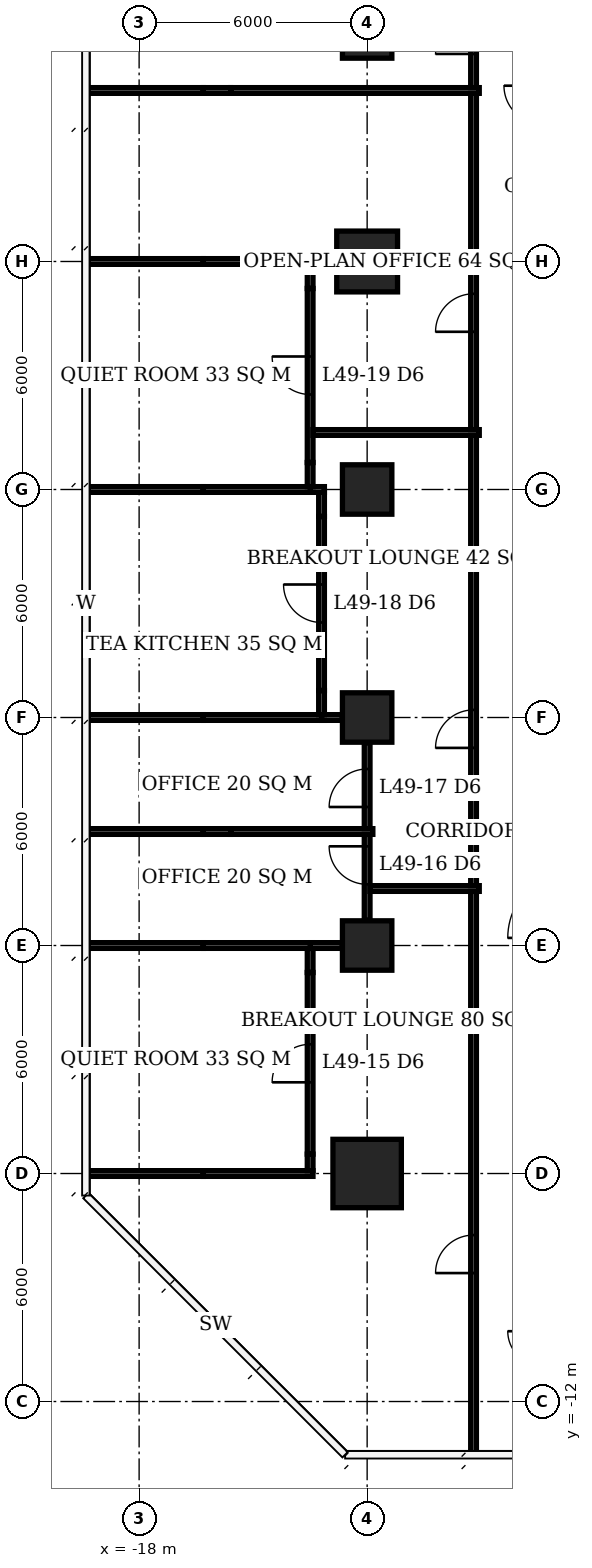
"""IFC4 building model, lengths in metres.
Left out: names, types, materials, properties, quantities, classifications, styles, units other than length and angle.
Written with IfcOpenShell. Run it as: python <this file> out.ifc"""

import sys

from ifc_helpers import new_model, si_unit, direction, frame, frame_2d, origin, origin_2d, place, context, subcontext, project, spatial, rectangle, extrude, element, fill, save


model = new_model("IFC4")
c1 = context("Model", 3, precision=1e-05, world=origin(), true_north=direction((0.0, 1.0)))
c2 = subcontext(c1, "Body", "Model", "MODEL_VIEW")
j1 = project(units=[si_unit("LENGTHUNIT", "METRE"), si_unit("PLANEANGLEUNIT", "RADIAN")], contexts=[c1])
p1 = place(None, origin())
s1 = spatial("IfcSite", under=j1, at=p1, CompositionType="ELEMENT")
p2 = place(p1, origin())
s2 = spatial("IfcBuilding", under=s1, at=p2, CompositionType="ELEMENT")
p3 = place(p2, frame((0.0, 0.0, 200.6)))
s3 = spatial("IfcBuildingStorey", under=s2, at=p3, CompositionType="ELEMENT", Elevation=200.6)
p4 = place(p3, frame((-12.0, -6.0, 0.0), z_axis=(0.0, 0.0, 1.0), x_axis=(1.0, 0.0, 0.0)))
e1 = element("IfcColumn", 1, at=p4, inside=s3, PredefinedType="COLUMN", context=c2, shape_type="SweptSolid", body=[
    extrude(rectangle(XDim=1.8, YDim=1.8, at=origin_2d()), origin(), (0.0, 0.0, 1.0), 3.9),
])
for number, where, z_axis, x_axis in (
    (2, (-12.0, 0.0, 0.0), (0.0, 0.0, 1.0), (1.0, 0.0, 0.0)),
    (3, (-12.0, 6.0, 0.0), (0.0, 0.0, 1.0), (1.0, 0.0, 0.0)),
    (4, (-12.0, 12.0, 0.0), (0.0, 0.0, 1.0), (1.0, 0.0, 0.0)),
):
    element("IfcColumn", number, at=place(p3, frame(where, z_axis=z_axis, x_axis=x_axis)), inside=s3, PredefinedType="COLUMN", context=c2, shape_type="SweptSolid", body=[
        extrude(rectangle(XDim=1.3, YDim=1.3, at=origin_2d()), origin(), (0.0, 0.0, 1.0), 3.9),
    ])
p5 = place(p3, frame((-12.0, 18.0, 0.0), z_axis=(0.0, 0.0, 1.0), x_axis=(1.0, 0.0, 0.0)))
e5 = element("IfcColumn", 5, at=p5, inside=s3, PredefinedType="COLUMN", context=c2, shape_type="SweptSolid", body=[
    extrude(rectangle(XDim=1.6, YDim=1.6, at=origin_2d()), origin(), (0.0, 0.0, 1.0), 3.9),
])
p6 = place(p3, frame((-12.0, 24.0, 0.0), z_axis=(0.0, 0.0, 1.0), x_axis=(1.0, 0.0, 0.0)))
e6 = element("IfcColumn", 6, at=p6, inside=s3, PredefinedType="COLUMN", context=c2, shape_type="SweptSolid", body=[
    extrude(rectangle(XDim=1.3, YDim=1.3, at=origin_2d()), origin(), (0.0, 0.0, 1.0), 3.9),
])
p7 = place(p3, frame((-19.4, -6.0, 0.0), z_axis=(0.0, 0.0, 1.0), x_axis=(1.0, 0.0, 0.0)))
e7 = element("IfcWall", 7, at=p7, inside=s3, PredefinedType="PARTITIONING", context=c2, shape_type="SweptSolid", body=[
    extrude(rectangle(XDim=3.09, YDim=0.15, at=frame_2d((1.545, 0.0))), origin(), (0.0, 0.0, 1.0), 3.65),
])
p8 = place(p3, frame((-16.31, -6.0, 0.0), z_axis=(0.0, 0.0, 1.0), x_axis=(1.0, 0.0, 0.0)))
e8 = element("IfcWall", 8, at=p8, inside=s3, PredefinedType="PARTITIONING", context=c2, shape_type="SweptSolid", body=[
    extrude(rectangle(XDim=2.885, YDim=0.15, at=frame_2d((1.442, 0.0))), origin(), (0.0, 0.0, 1.0), 2.65),
])
p9 = place(p3, frame((-19.4, 0.0, 0.0), z_axis=(0.0, 0.0, 1.0), x_axis=(1.0, 0.0, 0.0)))
e9 = element("IfcWall", 9, at=p9, inside=s3, PredefinedType="PARTITIONING", context=c2, shape_type="SweptSolid", body=[
    extrude(rectangle(XDim=3.09, YDim=0.15, at=frame_2d((1.545, 0.0))), origin(), (0.0, 0.0, 1.0), 3.65),
])
p10 = place(p3, frame((-16.31, 0.0, 0.0), z_axis=(0.0, 0.0, 1.0), x_axis=(1.0, 0.0, 0.0)))
e10 = element("IfcWall", 10, at=p10, inside=s3, PredefinedType="PARTITIONING", context=c2, shape_type="SweptSolid", body=[
    extrude(rectangle(XDim=2.885, YDim=0.15, at=frame_2d((1.442, 0.0))), origin(), (0.0, 0.0, 1.0), 2.65),
])
p11 = place(p3, frame((-13.5, 0.0, 0.0), z_axis=(0.0, 0.0, 1.0), x_axis=(1.0, 0.0, 0.0)))
e11 = element("IfcWall", 11, at=p11, inside=s3, PredefinedType="PARTITIONING", context=c2, shape_type="SweptSolid", body=[
    extrude(rectangle(XDim=0.85, YDim=0.15, at=frame_2d((0.425, 0.0))), origin(), (0.0, 0.0, 1.0), 2.65),
])
p12 = place(p3, frame((-19.4, 3.0, 0.0), z_axis=(0.0, 0.0, 1.0), x_axis=(1.0, 0.0, 0.0)))
e12 = element("IfcWall", 12, at=p12, inside=s3, PredefinedType="PARTITIONING", context=c2, shape_type="SweptSolid", body=[
    extrude(rectangle(XDim=3.09, YDim=0.15, at=frame_2d((1.545, 0.0))), origin(), (0.0, 0.0, 1.0), 3.65),
])
p13 = place(p3, frame((-16.31, 3.0, 0.0), z_axis=(0.0, 0.0, 1.0), x_axis=(1.0, 0.0, 0.0)))
e13 = element("IfcWall", 13, at=p13, inside=s3, PredefinedType="PARTITIONING", context=c2, shape_type="SweptSolid", body=[
    extrude(rectangle(XDim=0.72, YDim=0.15, at=frame_2d((0.36, 0.0))), origin(), (0.0, 0.0, 1.0), 2.65),
])
p14 = place(p3, frame((-15.59, 3.0, 0.0), z_axis=(0.0, 0.0, 1.0), x_axis=(1.0, 0.0, 0.0)))
e14 = element("IfcWall", 14, at=p14, inside=s3, PredefinedType="PARTITIONING", context=c2, shape_type="SweptSolid", body=[
    extrude(rectangle(XDim=3.74, YDim=0.15, at=frame_2d((1.87, 0.0))), origin(), (0.0, 0.0, 1.0), 3.65),
])
p15 = place(p3, frame((-19.35, 6.0, 0.0), z_axis=(0.0, 0.0, 1.0), x_axis=(1.0, 0.0, 0.0)))
e15 = element("IfcWall", 15, at=p15, inside=s3, PredefinedType="PARTITIONING", context=c2, shape_type="SweptSolid", body=[
    extrude(rectangle(XDim=3.04, YDim=0.15, at=frame_2d((1.52, 0.0))), origin(), (0.0, 0.0, 1.0), 3.65),
])
p16 = place(p3, frame((-16.31, 6.0, 0.0), z_axis=(0.0, 0.0, 1.0), x_axis=(1.0, 0.0, 0.0)))
e16 = element("IfcWall", 16, at=p16, inside=s3, PredefinedType="PARTITIONING", context=c2, shape_type="SweptSolid", body=[
    extrude(rectangle(XDim=3.185, YDim=0.15, at=frame_2d((1.593, 0.0))), origin(), (0.0, 0.0, 1.0), 2.65),
])
p17 = place(p3, frame((-13.2, 6.0, 0.0), z_axis=(0.0, 0.0, 1.0), x_axis=(1.0, 0.0, 0.0)))
e17 = element("IfcWall", 17, at=p17, inside=s3, PredefinedType="PARTITIONING", context=c2, shape_type="SweptSolid", body=[
    extrude(rectangle(XDim=0.55, YDim=0.15, at=frame_2d((0.275, 0.0))), origin(), (0.0, 0.0, 1.0), 2.65),
])
p18 = place(p3, frame((-19.35, 12.0, 0.0), z_axis=(0.0, 0.0, 1.0), x_axis=(1.0, 0.0, 0.0)))
e18 = element("IfcWall", 18, at=p18, inside=s3, PredefinedType="PARTITIONING", context=c2, shape_type="SweptSolid", body=[
    extrude(rectangle(XDim=3.04, YDim=0.15, at=frame_2d((1.52, 0.0))), origin(), (0.0, 0.0, 1.0), 3.65),
])
p19 = place(p3, frame((-16.31, 12.0, 0.0), z_axis=(0.0, 0.0, 1.0), x_axis=(1.0, 0.0, 0.0)))
e19 = element("IfcWall", 19, at=p19, inside=s3, PredefinedType="PARTITIONING", context=c2, shape_type="SweptSolid", body=[
    extrude(rectangle(XDim=2.885, YDim=0.15, at=frame_2d((1.442, 0.0))), origin(), (0.0, 0.0, 1.0), 2.65),
])
p20 = place(p3, frame((-13.5, 12.0, 0.0), z_axis=(0.0, 0.0, 1.0), x_axis=(1.0, 0.0, 0.0)))
e20 = element("IfcWall", 20, at=p20, inside=s3, PredefinedType="PARTITIONING", context=c2, shape_type="SweptSolid", body=[
    extrude(rectangle(XDim=0.375, YDim=0.15, at=frame_2d((0.188, 0.0))), origin(), (0.0, 0.0, 1.0), 2.65),
])
p21 = place(p3, frame((-19.4, 18.0, 0.0), z_axis=(0.0, 0.0, 1.0), x_axis=(1.0, 0.0, 0.0)))
e21 = element("IfcWall", 21, at=p21, inside=s3, PredefinedType="PARTITIONING", context=c2, shape_type="SweptSolid", body=[
    extrude(rectangle(XDim=3.09, YDim=0.15, at=frame_2d((1.545, 0.0))), origin(), (0.0, 0.0, 1.0), 3.65),
])
p22 = place(p3, frame((-16.31, 18.0, 0.0), z_axis=(0.0, 0.0, 1.0), x_axis=(1.0, 0.0, 0.0)))
e22 = element("IfcWall", 22, at=p22, inside=s3, PredefinedType="PARTITIONING", context=c2, shape_type="SweptSolid", body=[
    extrude(rectangle(XDim=2.885, YDim=0.15, at=frame_2d((1.442, 0.0))), origin(), (0.0, 0.0, 1.0), 2.65),
])
p23 = place(p3, frame((-13.5, -5.925, 0.0), z_axis=(0.0, 0.0, 1.0), x_axis=(0.0, 1.0, 0.0)))
e23 = element("IfcWall", 23, at=p23, inside=s3, PredefinedType="PARTITIONING", context=c2, shape_type="SweptSolid", body=[
    extrude(rectangle(XDim=0.435, YDim=0.15, at=frame_2d((0.218, 0.0))), origin(), (0.0, 0.0, 1.0), 2.65),
])
p24 = place(p3, frame((-13.5, -5.49, 0.0), z_axis=(0.0, 0.0, 1.0), x_axis=(0.0, 1.0, 0.0)))
e24 = element("IfcWall", 24, at=p24, inside=s3, PredefinedType="PARTITIONING", context=c2, shape_type="SweptSolid", body=[
    extrude(rectangle(XDim=4.78, YDim=0.15, at=frame_2d((2.39, 0.0))), origin(), (0.0, 0.0, 1.0), 3.65),
])
p25 = place(p24, frame((1.89, 0.0, 0.0)))
e25 = element("IfcOpeningElement", 25, at=p25, cuts=e24, PredefinedType="OPENING", context=c2, shape_type="SweptSolid", body=[
    extrude(rectangle(XDim=1.0, YDim=2.1, at=frame_2d((0.5, 1.05))), frame((0.0, 0.085, 0.0), z_axis=(0.0, -1.0, 0.0), x_axis=(1.0, 0.0, 0.0)), (0.0, 0.0, 1.0), 0.17),
])
for number, where, z_axis, x_axis in (
    (26, (-13.5, -0.71, 0.0), (0.0, 0.0, 1.0), (0.0, 1.0, 0.0)),
    (27, (-13.5, 12.075, 0.0), (0.0, 0.0, 1.0), (0.0, 1.0, 0.0)),
):
    element("IfcWall", number, at=place(p3, frame(where, z_axis=z_axis, x_axis=x_axis)), inside=s3, PredefinedType="PARTITIONING", context=c2, shape_type="SweptSolid", body=[
        extrude(rectangle(XDim=0.635, YDim=0.15, at=frame_2d((0.317, 0.0))), origin(), (0.0, 0.0, 1.0), 2.65),
    ])
p26 = place(p3, frame((-13.5, 12.71, 0.0), z_axis=(0.0, 0.0, 1.0), x_axis=(0.0, 1.0, 0.0)))
e28 = element("IfcWall", 28, at=p26, inside=s3, PredefinedType="PARTITIONING", context=c2, shape_type="SweptSolid", body=[
    extrude(rectangle(XDim=4.58, YDim=0.15, at=frame_2d((2.29, 0.0))), origin(), (0.0, 0.0, 1.0), 3.65),
])
p27 = place(p26, frame((1.79, 0.0, 0.0)))
e29 = element("IfcOpeningElement", 29, at=p27, cuts=e28, PredefinedType="OPENING", context=c2, shape_type="SweptSolid", body=[
    extrude(rectangle(XDim=1.0, YDim=2.1, at=frame_2d((0.5, 1.05))), frame((0.0, 0.085, 0.0), z_axis=(0.0, -1.0, 0.0), x_axis=(1.0, 0.0, 0.0)), (0.0, 0.0, 1.0), 0.17),
])
for number, where, z_axis, x_axis in (
    (30, (-13.5, 17.29, 0.0), (0.0, 0.0, 1.0), (0.0, 1.0, 0.0)),
    (31, (-13.2, 6.075, 0.0), (0.0, 0.0, 1.0), (0.0, 1.0, 0.0)),
):
    element("IfcWall", number, at=place(p3, frame(where, z_axis=z_axis, x_axis=x_axis)), inside=s3, PredefinedType="PARTITIONING", context=c2, shape_type="SweptSolid", body=[
        extrude(rectangle(XDim=0.635, YDim=0.15, at=frame_2d((0.317, 0.0))), origin(), (0.0, 0.0, 1.0), 2.65),
    ])
p28 = place(p3, frame((-13.2, 6.71, 0.0), z_axis=(0.0, 0.0, 1.0), x_axis=(0.0, 1.0, 0.0)))
e32 = element("IfcWall", 32, at=p28, inside=s3, PredefinedType="PARTITIONING", context=c2, shape_type="SweptSolid", body=[
    extrude(rectangle(XDim=4.58, YDim=0.15, at=frame_2d((2.29, 0.0))), origin(), (0.0, 0.0, 1.0), 3.65),
])
p29 = place(p28, frame((1.79, 0.0, 0.0)))
e33 = element("IfcOpeningElement", 33, at=p29, cuts=e32, PredefinedType="OPENING", context=c2, shape_type="SweptSolid", body=[
    extrude(rectangle(XDim=1.0, YDim=2.1, at=frame_2d((0.5, 1.05))), frame((0.0, 0.085, 0.0), z_axis=(0.0, -1.0, 0.0), x_axis=(1.0, 0.0, 0.0)), (0.0, 0.0, 1.0), 0.17),
])
p30 = place(p3, frame((-13.2, 11.29, 0.0), z_axis=(0.0, 0.0, 1.0), x_axis=(0.0, 1.0, 0.0)))
e34 = element("IfcWall", 34, at=p30, inside=s3, PredefinedType="PARTITIONING", context=c2, shape_type="SweptSolid", body=[
    extrude(rectangle(XDim=0.635, YDim=0.15, at=frame_2d((0.317, 0.0))), origin(), (0.0, 0.0, 1.0), 2.65),
])
p31 = place(p3, frame((-12.0, 0.66, 0.0), z_axis=(0.0, 0.0, 1.0), x_axis=(0.0, 1.0, 0.0)))
e35 = element("IfcWall", 35, at=p31, inside=s3, PredefinedType="PARTITIONING", context=c2, shape_type="SweptSolid", body=[
    extrude(rectangle(XDim=2.265, YDim=0.15, at=frame_2d((1.133, 0.0))), origin(), (0.0, 0.0, 1.0), 3.65),
])
p32 = place(p31, frame((0.95, 0.0, 0.0)))
e36 = element("IfcOpeningElement", 36, at=p32, cuts=e35, PredefinedType="OPENING", context=c2, shape_type="SweptSolid", body=[
    extrude(rectangle(XDim=1.0, YDim=2.1, at=frame_2d((0.5, 1.05))), frame((0.0, 0.085, 0.0), z_axis=(0.0, -1.0, 0.0), x_axis=(1.0, 0.0, 0.0)), (0.0, 0.0, 1.0), 0.17),
])
p33 = place(p3, frame((-12.0, 3.075, 0.0), z_axis=(0.0, 0.0, 1.0), x_axis=(0.0, 1.0, 0.0)))
e37 = element("IfcWall", 37, at=p33, inside=s3, PredefinedType="PARTITIONING", context=c2, shape_type="SweptSolid", body=[
    extrude(rectangle(XDim=2.265, YDim=0.15, at=frame_2d((1.133, 0.0))), origin(), (0.0, 0.0, 1.0), 3.65),
])
p34 = place(p33, frame((0.57, 0.0, 0.0)))
e38 = element("IfcOpeningElement", 38, at=p34, cuts=e37, PredefinedType="OPENING", context=c2, shape_type="SweptSolid", body=[
    extrude(rectangle(XDim=1.0, YDim=2.1, at=frame_2d((0.5, 1.05))), frame((0.0, 0.085, 0.0), z_axis=(0.0, -1.0, 0.0), x_axis=(1.0, 0.0, 0.0)), (0.0, 0.0, 1.0), 0.17),
])
p35 = place(p3, frame((-19.4, 22.5, 0.0), z_axis=(0.0, 0.0, 1.0), x_axis=(1.0, 0.0, 0.0)))
e39 = element("IfcWall", 39, at=p35, inside=s3, PredefinedType="PARTITIONING", context=c2, shape_type="SweptSolid", body=[
    extrude(rectangle(XDim=3.09, YDim=0.15, at=frame_2d((1.545, 0.0))), origin(), (0.0, 0.0, 1.0), 3.65),
])
p36 = place(p3, frame((-16.31, 22.5, 0.0), z_axis=(0.0, 0.0, 1.0), x_axis=(1.0, 0.0, 0.0)))
e40 = element("IfcWall", 40, at=p36, inside=s3, PredefinedType="PARTITIONING", context=c2, shape_type="SweptSolid", body=[
    extrude(rectangle(XDim=0.72, YDim=0.15, at=frame_2d((0.36, 0.0))), origin(), (0.0, 0.0, 1.0), 2.65),
])
p37 = place(p3, frame((-15.59, 22.5, 0.0), z_axis=(0.0, 0.0, 1.0), x_axis=(1.0, 0.0, 0.0)))
e41 = element("IfcWall", 41, at=p37, inside=s3, PredefinedType="PARTITIONING", context=c2, shape_type="SweptSolid", body=[
    extrude(rectangle(XDim=6.54, YDim=0.15, at=frame_2d((3.27, 0.0))), origin(), (0.0, 0.0, 1.0), 3.65),
])
p38 = place(p3, frame((-13.425, 13.5, 0.0), z_axis=(0.0, 0.0, 1.0), x_axis=(1.0, 0.0, 0.0)))
e42 = element("IfcWall", 42, at=p38, inside=s3, PredefinedType="PARTITIONING", context=c2, shape_type="SweptSolid", body=[
    extrude(rectangle(XDim=4.375, YDim=0.15, at=frame_2d((2.188, 0.0))), origin(), (0.0, 0.0, 1.0), 3.65),
])
p39 = place(p3, frame((-11.925, 1.5, 0.0), z_axis=(0.0, 0.0, 1.0), x_axis=(1.0, 0.0, 0.0)))
e43 = element("IfcWall", 43, at=p39, inside=s3, PredefinedType="PARTITIONING", context=c2, shape_type="SweptSolid", body=[
    extrude(rectangle(XDim=2.875, YDim=0.15, at=frame_2d((1.438, 0.0))), origin(), (0.0, 0.0, 1.0), 3.65),
])
p40 = place(p3, frame((-9.2, -13.4, 0.0), z_axis=(0.0, 0.0, 1.0), x_axis=(0.0, 1.0, 0.0)))
e44 = element("IfcWall", 44, at=p40, inside=s3, PredefinedType="PARTITIONING", context=c2, shape_type="SweptSolid", body=[
    extrude(rectangle(XDim=14.825, YDim=0.15, at=frame_2d((7.413, 0.0))), origin(), (0.0, 0.0, 1.0), 3.65),
])
p41 = place(p40, frame((4.78, 0.0, 0.0)))
e45 = element("IfcOpeningElement", 45, at=p41, cuts=e44, PredefinedType="OPENING", context=c2, shape_type="SweptSolid", body=[
    extrude(rectangle(XDim=1.0, YDim=2.1, at=frame_2d((0.5, 1.05))), frame((0.0, 0.085, 0.0), z_axis=(0.0, -1.0, 0.0), x_axis=(1.0, 0.0, 0.0)), (0.0, 0.0, 1.0), 0.17),
])
p42 = place(p3, frame((-9.2, 1.575, 0.0), z_axis=(0.0, 0.0, 1.0), x_axis=(0.0, 1.0, 0.0)))
e46 = element("IfcWall", 46, at=p42, inside=s3, PredefinedType="PARTITIONING", context=c2, shape_type="SweptSolid", body=[
    extrude(rectangle(XDim=11.85, YDim=0.15, at=frame_2d((5.925, 0.0))), origin(), (0.0, 0.0, 1.0), 3.65),
])
p43 = place(p42, frame((3.625, 0.0, 0.0)))
e47 = element("IfcOpeningElement", 47, at=p43, cuts=e46, PredefinedType="OPENING", context=c2, shape_type="SweptSolid", body=[
    extrude(rectangle(XDim=1.0, YDim=2.1, at=frame_2d((0.5, 1.05))), frame((0.0, 0.085, 0.0), z_axis=(0.0, -1.0, 0.0), x_axis=(1.0, 0.0, 0.0)), (0.0, 0.0, 1.0), 0.17),
])
p44 = place(p3, frame((-9.2, 13.575, 0.0), z_axis=(0.0, 0.0, 1.0), x_axis=(0.0, 1.0, 0.0)))
e48 = element("IfcWall", 48, at=p44, inside=s3, PredefinedType="PARTITIONING", context=c2, shape_type="SweptSolid", body=[
    extrude(rectangle(XDim=8.85, YDim=0.15, at=frame_2d((4.425, 0.0))), origin(), (0.0, 0.0, 1.0), 3.65),
])
p45 = place(p44, frame((2.575, 0.0, 0.0)))
e49 = element("IfcOpeningElement", 49, at=p45, cuts=e48, PredefinedType="OPENING", context=c2, shape_type="SweptSolid", body=[
    extrude(rectangle(XDim=1.0, YDim=2.1, at=frame_2d((0.5, 1.05))), frame((0.0, 0.085, 0.0), z_axis=(0.0, -1.0, 0.0), x_axis=(1.0, 0.0, 0.0)), (0.0, 0.0, 1.0), 0.17),
])
p46 = place(p3, frame((-9.2, 22.575, 0.0), z_axis=(0.0, 0.0, 1.0), x_axis=(0.0, 1.0, 0.0)))
e50 = element("IfcWall", 50, at=p46, inside=s3, PredefinedType="PARTITIONING", context=c2, shape_type="SweptSolid", body=[
    extrude(rectangle(XDim=2.85, YDim=0.15, at=frame_2d((1.425, 0.0))), origin(), (0.0, 0.0, 1.0), 3.65),
])
p47 = place(p46, frame((0.887, 0.0, 0.0)))
e51 = element("IfcOpeningElement", 51, at=p47, cuts=e50, PredefinedType="OPENING", context=c2, shape_type="SweptSolid", body=[
    extrude(rectangle(XDim=1.0, YDim=2.1, at=frame_2d((0.5, 1.05))), frame((0.0, 0.085, 0.0), z_axis=(0.0, -1.0, 0.0), x_axis=(1.0, 0.0, 0.0)), (0.0, 0.0, 1.0), 0.17),
])
p48 = place(p25, origin())
e52 = element("IfcDoor", 52, at=p48, inside=s3, OperationType="SINGLE_SWING_LEFT", PredefinedType="DOOR", context=c2, shape_type="SweptSolid", body=[
    extrude(rectangle(XDim=1.0, YDim=2.1, at=frame_2d((0.5, 1.05))), frame((0.0, 0.025, 0.0), z_axis=(0.0, -1.0, 0.0), x_axis=(1.0, 0.0, 0.0)), (0.0, 0.0, 1.0), 0.05),
])
fill(e25, e52)
p49 = place(p32, origin())
e53 = element("IfcDoor", 53, at=p49, inside=s3, OperationType="SINGLE_SWING_RIGHT", PredefinedType="DOOR", context=c2, shape_type="SweptSolid", body=[
    extrude(rectangle(XDim=1.0, YDim=2.1, at=frame_2d((0.5, 1.05))), frame((0.0, 0.025, 0.0), z_axis=(0.0, -1.0, 0.0), x_axis=(1.0, 0.0, 0.0)), (0.0, 0.0, 1.0), 0.05),
])
fill(e36, e53)
p50 = place(p34, origin())
e54 = element("IfcDoor", 54, at=p50, inside=s3, OperationType="SINGLE_SWING_LEFT", PredefinedType="DOOR", context=c2, shape_type="SweptSolid", body=[
    extrude(rectangle(XDim=1.0, YDim=2.1, at=frame_2d((0.5, 1.05))), frame((0.0, 0.025, 0.0), z_axis=(0.0, -1.0, 0.0), x_axis=(1.0, 0.0, 0.0)), (0.0, 0.0, 1.0), 0.05),
])
fill(e38, e54)
p51 = place(p29, origin())
e55 = element("IfcDoor", 55, at=p51, inside=s3, OperationType="SINGLE_SWING_RIGHT", PredefinedType="DOOR", context=c2, shape_type="SweptSolid", body=[
    extrude(rectangle(XDim=1.0, YDim=2.1, at=frame_2d((0.5, 1.05))), frame((0.0, 0.025, 0.0), z_axis=(0.0, -1.0, 0.0), x_axis=(1.0, 0.0, 0.0)), (0.0, 0.0, 1.0), 0.05),
])
fill(e33, e55)
p52 = place(p27, origin())
e56 = element("IfcDoor", 56, at=p52, inside=s3, OperationType="SINGLE_SWING_RIGHT", PredefinedType="DOOR", context=c2, shape_type="SweptSolid", body=[
    extrude(rectangle(XDim=1.0, YDim=2.1, at=frame_2d((0.5, 1.05))), frame((0.0, 0.025, 0.0), z_axis=(0.0, -1.0, 0.0), x_axis=(1.0, 0.0, 0.0)), (0.0, 0.0, 1.0), 0.05),
])
fill(e29, e56)
p53 = place(p41, origin())
e57 = element("IfcDoor", 57, at=p53, inside=s3, OperationType="SINGLE_SWING_LEFT", PredefinedType="DOOR", context=c2, shape_type="SweptSolid", body=[
    extrude(rectangle(XDim=1.0, YDim=2.1, at=frame_2d((0.5, 1.05))), frame((0.0, 0.025, 0.0), z_axis=(0.0, -1.0, 0.0), x_axis=(1.0, 0.0, 0.0)), (0.0, 0.0, 1.0), 0.05),
])
fill(e45, e57)
p54 = place(p43, origin())
e58 = element("IfcDoor", 58, at=p54, inside=s3, OperationType="SINGLE_SWING_LEFT", PredefinedType="DOOR", context=c2, shape_type="SweptSolid", body=[
    extrude(rectangle(XDim=1.0, YDim=2.1, at=frame_2d((0.5, 1.05))), frame((0.0, 0.025, 0.0), z_axis=(0.0, -1.0, 0.0), x_axis=(1.0, 0.0, 0.0)), (0.0, 0.0, 1.0), 0.05),
])
fill(e47, e58)
p55 = place(p45, origin())
e59 = element("IfcDoor", 59, at=p55, inside=s3, OperationType="SINGLE_SWING_LEFT", PredefinedType="DOOR", context=c2, shape_type="SweptSolid", body=[
    extrude(rectangle(XDim=1.0, YDim=2.1, at=frame_2d((0.5, 1.05))), frame((0.0, 0.025, 0.0), z_axis=(0.0, -1.0, 0.0), x_axis=(1.0, 0.0, 0.0)), (0.0, 0.0, 1.0), 0.05),
])
fill(e49, e59)
p56 = place(p47, origin())
e60 = element("IfcDoor", 60, at=p56, inside=s3, OperationType="SINGLE_SWING_LEFT", PredefinedType="DOOR", context=c2, shape_type="SweptSolid", body=[
    extrude(rectangle(XDim=1.0, YDim=2.1, at=frame_2d((0.5, 1.05))), frame((0.0, 0.025, 0.0), z_axis=(0.0, -1.0, 0.0), x_axis=(1.0, 0.0, 0.0)), (0.0, 0.0, 1.0), 0.05),
])
fill(e51, e60)
save(model, sys.argv[1])
